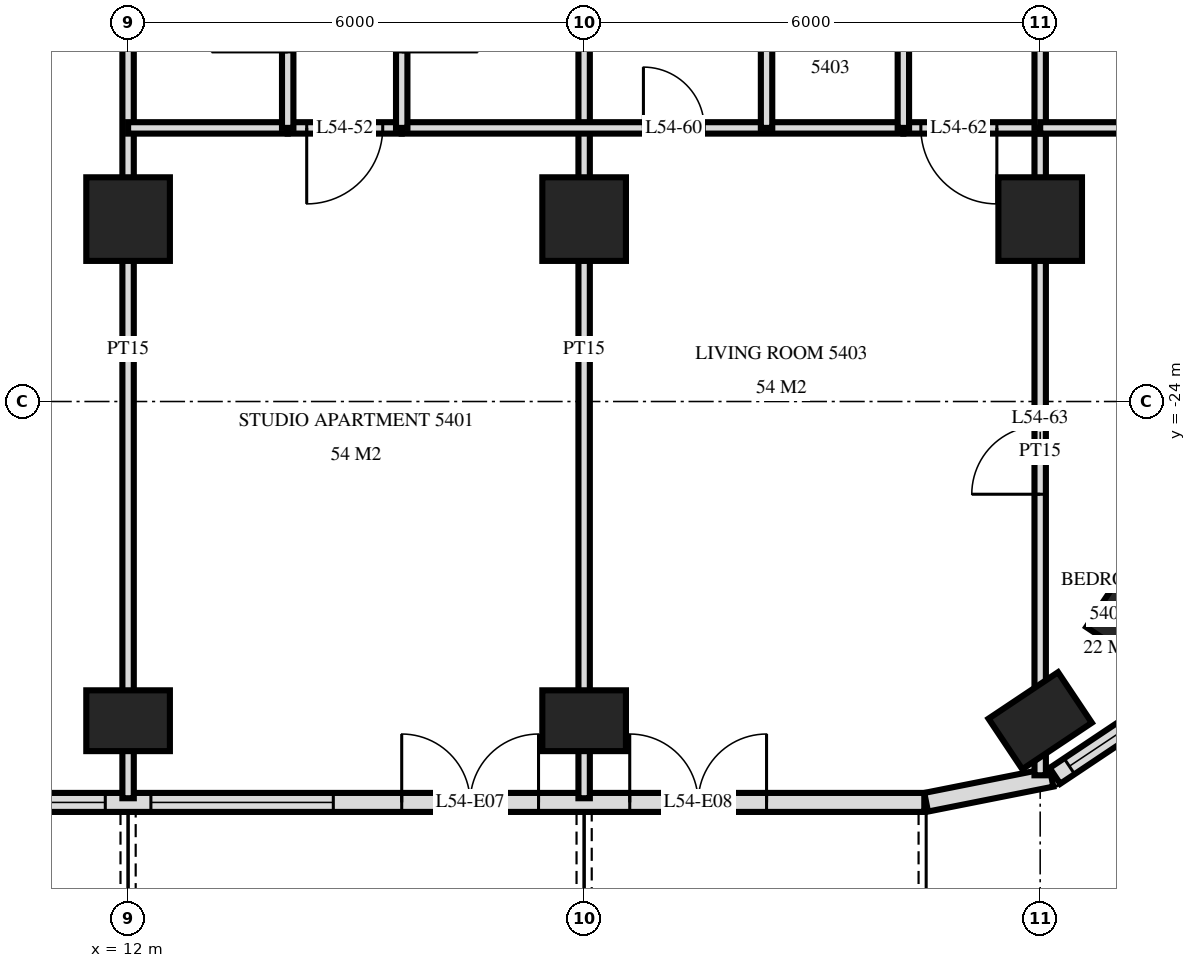
"""IFC4 building model, lengths in metres.
Left out: names, types, materials, properties, quantities, classifications, styles, units other than length and angle.
Written with IfcOpenShell. Run it as: python <this file> out.ifc"""

import sys

from ifc_helpers import new_model, si_unit, direction, frame, frame_2d, origin, origin_2d, place, context, subcontext, project, spatial, rectangle, extrude, element, fill, save


model = new_model("IFC4")
c1 = context("Model", 3, precision=1e-05, world=origin(), true_north=direction((0.0, 1.0)))
c2 = subcontext(c1, "Body", "Model", "MODEL_VIEW")
j1 = project(units=[si_unit("LENGTHUNIT", "METRE"), si_unit("PLANEANGLEUNIT", "RADIAN")], contexts=[c1])
p1 = place(None, origin())
s1 = spatial("IfcSite", under=j1, at=p1, CompositionType="ELEMENT")
p2 = place(p1, origin())
s2 = spatial("IfcBuilding", under=s1, at=p2, CompositionType="ELEMENT")
p3 = place(p2, frame((0.0, 0.0, 208.1)))
s3 = spatial("IfcBuildingStorey", under=s2, at=p3, CompositionType="ELEMENT", Elevation=208.1)
p4 = place(p3, frame((12.0, -28.2, 0.0), z_axis=(0.0, 0.0, 1.0), x_axis=(1.0, 0.0, 0.0)))
e1 = element("IfcColumn", 1, at=p4, inside=s3, PredefinedType="COLUMN", context=c2, shape_type="SweptSolid", body=[
    extrude(rectangle(XDim=1.1, YDim=0.8, at=origin_2d()), origin(), (0.0, 0.0, 1.0), 3.5),
])
p5 = place(p3, frame((12.0, -21.6, 0.0), z_axis=(0.0, 0.0, 1.0), x_axis=(1.0, 0.0, 0.0)))
e2 = element("IfcColumn", 2, at=p5, inside=s3, PredefinedType="COLUMN", context=c2, shape_type="SweptSolid", body=[
    extrude(rectangle(XDim=1.1, YDim=1.1, at=origin_2d()), origin(), (0.0, 0.0, 1.0), 3.5),
])
p6 = place(p3, frame((18.0, -28.2, 0.0), z_axis=(0.0, 0.0, 1.0), x_axis=(1.0, 0.0, 0.0)))
e3 = element("IfcColumn", 3, at=p6, inside=s3, PredefinedType="COLUMN", context=c2, shape_type="SweptSolid", body=[
    extrude(rectangle(XDim=1.1, YDim=0.8, at=origin_2d()), origin(), (0.0, 0.0, 1.0), 3.5),
])
p7 = place(p3, frame((18.0, -21.6, 0.0), z_axis=(0.0, 0.0, 1.0), x_axis=(1.0, 0.0, 0.0)))
e4 = element("IfcColumn", 4, at=p7, inside=s3, PredefinedType="COLUMN", context=c2, shape_type="SweptSolid", body=[
    extrude(rectangle(XDim=1.1, YDim=1.1, at=origin_2d()), origin(), (0.0, 0.0, 1.0), 3.5),
])
p8 = place(p3, frame((24.0, -28.2, 0.0), z_axis=(0.0, 0.0, 1.0), x_axis=(0.831459915646, 0.555584744817, 0.0)))
e5 = element("IfcColumn", 5, at=p8, inside=s3, PredefinedType="COLUMN", context=c2, shape_type="SweptSolid", body=[
    extrude(rectangle(XDim=1.1, YDim=0.8, at=origin_2d()), origin(), (0.0, 0.0, 1.0), 3.5),
])
p9 = place(p3, frame((24.0, -21.6, 0.0), z_axis=(0.0, 0.0, 1.0), x_axis=(1.0, 0.0, 0.0)))
e6 = element("IfcColumn", 6, at=p9, inside=s3, PredefinedType="COLUMN", context=c2, shape_type="SweptSolid", body=[
    extrude(rectangle(XDim=1.1, YDim=1.1, at=origin_2d()), origin(), (0.0, 0.0, 1.0), 3.5),
])
p10 = place(p3, frame((25.244, -26.733, 0.0), z_axis=(0.0, 0.0, 1.0), x_axis=(0.555584744817, 0.831459915646, 0.0)))
e7 = element("IfcColumn", 7, at=p10, inside=s3, PredefinedType="COLUMN", context=c2, shape_type="SweptSolid", body=[
    extrude(rectangle(XDim=1.1, YDim=0.8, at=origin_2d()), origin(), (0.0, 0.0, 1.0), 3.5),
])
p11 = place(p3, frame((-22.475, -29.275, 0.0), z_axis=(0.0, 0.0, 1.0), x_axis=(1.0, 0.0, 0.0)))
e8 = element("IfcWall", 8, at=p11, inside=s3, PredefinedType="SOLIDWALL", context=c2, shape_type="SweptSolid", body=[
    extrude(rectangle(XDim=44.951, YDim=0.25, at=frame_2d((22.475, 0.0))), origin(), (0.0, 0.0, 1.0), 3.22),
])
p12 = place(p11, frame((0.575, 0.0, 0.0)))
e9 = element("IfcOpeningElement", 9, at=p12, cuts=e8, PredefinedType="OPENING", context=c2, shape_type="SweptSolid", body=[
    extrude(rectangle(XDim=1.8, YDim=2.4, at=frame_2d((0.9, 1.2))), frame((0.0, 0.135, 0.0), z_axis=(0.0, -1.0, 0.0), x_axis=(1.0, 0.0, 0.0)), (0.0, 0.0, 1.0), 0.27),
])
p13 = place(p11, frame((6.2, 0.0, 0.0)))
e10 = element("IfcOpeningElement", 10, at=p13, cuts=e8, PredefinedType="OPENING", context=c2, shape_type="SweptSolid", body=[
    extrude(rectangle(XDim=1.8, YDim=2.4, at=frame_2d((0.9, 1.2))), frame((0.0, 0.135, 0.0), z_axis=(0.0, -1.0, 0.0), x_axis=(1.0, 0.0, 0.0)), (0.0, 0.0, 1.0), 0.27),
])
p14 = place(p11, frame((8.45, 0.0, 0.9)))
e11 = element("IfcOpeningElement", 11, at=p14, cuts=e8, PredefinedType="OPENING", context=c2, shape_type="SweptSolid", body=[
    extrude(rectangle(XDim=1.8, YDim=1.5, at=frame_2d((0.9, 0.75))), frame((0.0, 0.135, 0.0), z_axis=(0.0, -1.0, 0.0), x_axis=(1.0, 0.0, 0.0)), (0.0, 0.0, 1.0), 0.27),
])
p15 = place(p11, frame((11.075, 0.0, 0.0)))
e12 = element("IfcOpeningElement", 12, at=p15, cuts=e8, PredefinedType="OPENING", context=c2, shape_type="SweptSolid", body=[
    extrude(rectangle(XDim=1.8, YDim=2.4, at=frame_2d((0.9, 1.2))), frame((0.0, 0.135, 0.0), z_axis=(0.0, -1.0, 0.0), x_axis=(1.0, 0.0, 0.0)), (0.0, 0.0, 1.0), 0.27),
])
p16 = place(p11, frame((13.775, 0.0, 0.9)))
e13 = element("IfcOpeningElement", 13, at=p16, cuts=e8, PredefinedType="OPENING", context=c2, shape_type="SweptSolid", body=[
    extrude(rectangle(XDim=2.4, YDim=1.5, at=frame_2d((1.2, 0.75))), frame((0.0, 0.135, 0.0), z_axis=(0.0, -1.0, 0.0), x_axis=(1.0, 0.0, 0.0)), (0.0, 0.0, 1.0), 0.27),
])
p17 = place(p11, frame((16.775, 0.0, 0.9)))
e14 = element("IfcOpeningElement", 14, at=p17, cuts=e8, PredefinedType="OPENING", context=c2, shape_type="SweptSolid", body=[
    extrude(rectangle(XDim=2.4, YDim=1.5, at=frame_2d((1.2, 0.75))), frame((0.0, 0.135, 0.0), z_axis=(0.0, -1.0, 0.0), x_axis=(1.0, 0.0, 0.0)), (0.0, 0.0, 1.0), 0.27),
])
p18 = place(p11, frame((20.075, 0.0, 0.0)))
e15 = element("IfcOpeningElement", 15, at=p18, cuts=e8, PredefinedType="OPENING", context=c2, shape_type="SweptSolid", body=[
    extrude(rectangle(XDim=1.8, YDim=2.4, at=frame_2d((0.9, 1.2))), frame((0.0, 0.135, 0.0), z_axis=(0.0, -1.0, 0.0), x_axis=(1.0, 0.0, 0.0)), (0.0, 0.0, 1.0), 0.27),
])
p19 = place(p11, frame((23.075, 0.0, 0.0)))
e16 = element("IfcOpeningElement", 16, at=p19, cuts=e8, PredefinedType="OPENING", context=c2, shape_type="SweptSolid", body=[
    extrude(rectangle(XDim=1.8, YDim=2.4, at=frame_2d((0.9, 1.2))), frame((0.0, 0.135, 0.0), z_axis=(0.0, -1.0, 0.0), x_axis=(1.0, 0.0, 0.0)), (0.0, 0.0, 1.0), 0.27),
])
p20 = place(p11, frame((25.775, 0.0, 0.9)))
e17 = element("IfcOpeningElement", 17, at=p20, cuts=e8, PredefinedType="OPENING", context=c2, shape_type="SweptSolid", body=[
    extrude(rectangle(XDim=2.4, YDim=1.5, at=frame_2d((1.2, 0.75))), frame((0.0, 0.135, 0.0), z_axis=(0.0, -1.0, 0.0), x_axis=(1.0, 0.0, 0.0)), (0.0, 0.0, 1.0), 0.27),
])
p21 = place(p11, frame((29.075, 0.0, 0.0)))
e18 = element("IfcOpeningElement", 18, at=p21, cuts=e8, PredefinedType="OPENING", context=c2, shape_type="SweptSolid", body=[
    extrude(rectangle(XDim=1.8, YDim=2.4, at=frame_2d((0.9, 1.2))), frame((0.0, 0.135, 0.0), z_axis=(0.0, -1.0, 0.0), x_axis=(1.0, 0.0, 0.0)), (0.0, 0.0, 1.0), 0.27),
])
p22 = place(p11, frame((31.775, 0.0, 0.9)))
e19 = element("IfcOpeningElement", 19, at=p22, cuts=e8, PredefinedType="OPENING", context=c2, shape_type="SweptSolid", body=[
    extrude(rectangle(XDim=2.4, YDim=1.5, at=frame_2d((1.2, 0.75))), frame((0.0, 0.135, 0.0), z_axis=(0.0, -1.0, 0.0), x_axis=(1.0, 0.0, 0.0)), (0.0, 0.0, 1.0), 0.27),
])
p23 = place(p11, frame((34.775, 0.0, 0.9)))
e20 = element("IfcOpeningElement", 20, at=p23, cuts=e8, PredefinedType="OPENING", context=c2, shape_type="SweptSolid", body=[
    extrude(rectangle(XDim=2.4, YDim=1.5, at=frame_2d((1.2, 0.75))), frame((0.0, 0.135, 0.0), z_axis=(0.0, -1.0, 0.0), x_axis=(1.0, 0.0, 0.0)), (0.0, 0.0, 1.0), 0.27),
])
p24 = place(p11, frame((38.075, 0.0, 0.0)))
e21 = element("IfcOpeningElement", 21, at=p24, cuts=e8, PredefinedType="OPENING", context=c2, shape_type="SweptSolid", body=[
    extrude(rectangle(XDim=1.8, YDim=2.4, at=frame_2d((0.9, 1.2))), frame((0.0, 0.135, 0.0), z_axis=(0.0, -1.0, 0.0), x_axis=(1.0, 0.0, 0.0)), (0.0, 0.0, 1.0), 0.27),
])
p25 = place(p11, frame((41.075, 0.0, 0.0)))
e22 = element("IfcOpeningElement", 22, at=p25, cuts=e8, PredefinedType="OPENING", context=c2, shape_type="SweptSolid", body=[
    extrude(rectangle(XDim=1.8, YDim=2.4, at=frame_2d((0.9, 1.2))), frame((0.0, 0.135, 0.0), z_axis=(0.0, -1.0, 0.0), x_axis=(1.0, 0.0, 0.0)), (0.0, 0.0, 1.0), 0.27),
])
p26 = place(p3, frame((22.5, -29.273, 0.0), z_axis=(0.0, 0.0, 1.0), x_axis=(0.980775640221, 0.19513878023, 0.0)))
e23 = element("IfcWall", 23, at=p26, inside=s3, PredefinedType="SOLIDWALL", context=c2, shape_type="SweptSolid", body=[
    extrude(rectangle(XDim=1.681, YDim=0.25, at=frame_2d((0.841, 0.0))), origin(), (0.0, 0.0, 1.0), 3.22),
])
p27 = place(p3, frame((24.194, -28.926, 0.0), z_axis=(0.0, 0.0, 1.0), x_axis=(0.831482937015, 0.55555029066, 0.0)))
e24 = element("IfcWall", 24, at=p27, inside=s3, PredefinedType="SOLIDWALL", context=c2, shape_type="SweptSolid", body=[
    extrude(rectangle(XDim=1.656, YDim=0.25, at=frame_2d((0.828, 0.0))), origin(), (0.0, 0.0, 1.0), 3.22),
])
p28 = place(p27, frame((0.228, 0.0, 0.9)))
e25 = element("IfcOpeningElement", 25, at=p28, cuts=e24, PredefinedType="OPENING", context=c2, shape_type="SweptSolid", body=[
    extrude(rectangle(XDim=1.2, YDim=1.5, at=frame_2d((0.6, 0.75))), frame((0.0, 0.135, 0.0), z_axis=(0.0, -1.0, 0.0), x_axis=(1.0, 0.0, 0.0)), (0.0, 0.0, 1.0), 0.27),
])
p29 = place(p3, frame((24.0, -20.4, 0.0), z_axis=(0.0, 0.0, 1.0), x_axis=(0.0, 1.0, 0.0)))
e26 = element("IfcWall", 26, at=p29, inside=s3, PredefinedType="PARTITIONING", context=c2, shape_type="SweptSolid", body=[
    extrude(rectangle(XDim=3.0, YDim=0.15, at=frame_2d((1.5, 0.0))), origin(), (0.0, 0.0, 1.0), 3.22),
])
p30 = place(p29, frame((1.02, 0.0, 0.0)))
e27 = element("IfcOpeningElement", 27, at=p30, cuts=e26, PredefinedType="OPENING", context=c2, shape_type="SweptSolid", body=[
    extrude(rectangle(XDim=1.0, YDim=2.1, at=frame_2d((0.5, 1.05))), frame((0.0, 0.085, 0.0), z_axis=(0.0, -1.0, 0.0), x_axis=(1.0, 0.0, 0.0)), (0.0, 0.0, 1.0), 0.17),
])
p31 = place(p3, frame((24.0, -28.918, 0.0), z_axis=(0.0, 0.0, 1.0), x_axis=(0.0, 1.0, 0.0)))
e28 = element("IfcWall", 28, at=p31, inside=s3, PredefinedType="PARTITIONING", context=c2, shape_type="SweptSolid", body=[
    extrude(rectangle(XDim=8.518, YDim=0.15, at=frame_2d((4.259, 0.0))), origin(), (0.0, 0.0, 1.0), 3.22),
])
p32 = place(p31, frame((3.698, 0.0, 0.0)))
e29 = element("IfcOpeningElement", 29, at=p32, cuts=e28, PredefinedType="OPENING", context=c2, shape_type="SweptSolid", body=[
    extrude(rectangle(XDim=0.9, YDim=2.1, at=frame_2d((0.45, 1.05))), frame((0.0, 0.085, 0.0), z_axis=(0.0, -1.0, 0.0), x_axis=(1.0, 0.0, 0.0)), (0.0, 0.0, 1.0), 0.17),
])
for number, where, z_axis, x_axis in (
    (30, (22.2, -20.4, 0.0), (0.0, 0.0, 1.0), (0.0, 1.0, 0.0)),
    (31, (20.4, -20.4, 0.0), (0.0, 0.0, 1.0), (0.0, 1.0, 0.0)),
):
    element("IfcWall", number, at=place(p3, frame(where, z_axis=z_axis, x_axis=x_axis)), inside=s3, PredefinedType="PARTITIONING", context=c2, shape_type="SweptSolid", body=[
        extrude(rectangle(XDim=3.0, YDim=0.15, at=frame_2d((1.5, 0.0))), origin(), (0.0, 0.0, 1.0), 3.22),
    ])
p33 = place(p3, frame((18.0, -29.22, 0.0), z_axis=(0.0, 0.0, 1.0), x_axis=(0.0, 1.0, 0.0)))
e32 = element("IfcWall", 32, at=p33, inside=s3, PredefinedType="PARTITIONING", context=c2, shape_type="SweptSolid", body=[
    extrude(rectangle(XDim=11.82, YDim=0.15, at=frame_2d((5.91, 0.0))), origin(), (0.0, 0.0, 1.0), 3.22),
])
p34 = place(p3, frame((15.6, -20.4, 0.0), z_axis=(0.0, 0.0, 1.0), x_axis=(0.0, 1.0, 0.0)))
e33 = element("IfcWall", 33, at=p34, inside=s3, PredefinedType="PARTITIONING", context=c2, shape_type="SweptSolid", body=[
    extrude(rectangle(XDim=3.0, YDim=0.15, at=frame_2d((1.5, 0.0))), origin(), (0.0, 0.0, 1.0), 3.22),
])
p35 = place(p34, frame((1.0, 0.0, 0.0)))
e34 = element("IfcOpeningElement", 34, at=p35, cuts=e33, PredefinedType="OPENING", context=c2, shape_type="SweptSolid", body=[
    extrude(rectangle(XDim=1.0, YDim=2.1, at=frame_2d((0.5, 1.05))), frame((0.0, 0.085, 0.0), z_axis=(0.0, -1.0, 0.0), x_axis=(1.0, 0.0, 0.0)), (0.0, 0.0, 1.0), 0.17),
])
p36 = place(p3, frame((14.1, -20.4, 0.0), z_axis=(0.0, 0.0, 1.0), x_axis=(0.0, 1.0, 0.0)))
e35 = element("IfcWall", 35, at=p36, inside=s3, PredefinedType="PARTITIONING", context=c2, shape_type="SweptSolid", body=[
    extrude(rectangle(XDim=3.0, YDim=0.15, at=frame_2d((1.5, 0.0))), origin(), (0.0, 0.0, 1.0), 3.22),
])
p37 = place(p36, frame((1.0, 0.0, 0.0)))
e36 = element("IfcOpeningElement", 36, at=p37, cuts=e35, PredefinedType="OPENING", context=c2, shape_type="SweptSolid", body=[
    extrude(rectangle(XDim=1.0, YDim=2.1, at=frame_2d((0.5, 1.05))), frame((0.0, 0.085, 0.0), z_axis=(0.0, -1.0, 0.0), x_axis=(1.0, 0.0, 0.0)), (0.0, 0.0, 1.0), 0.17),
])
p38 = place(p3, frame((12.0, -29.22, 0.0), z_axis=(0.0, 0.0, 1.0), x_axis=(0.0, 1.0, 0.0)))
e37 = element("IfcWall", 37, at=p38, inside=s3, PredefinedType="PARTITIONING", context=c2, shape_type="SweptSolid", body=[
    extrude(rectangle(XDim=11.82, YDim=0.15, at=frame_2d((5.91, 0.0))), origin(), (0.0, 0.0, 1.0), 3.22),
])
p39 = place(p3, frame((14.1, -20.4, 0.0), z_axis=(0.0, 0.0, 1.0), x_axis=(1.0, 0.0, 0.0)))
e38 = element("IfcWall", 38, at=p39, inside=s3, PredefinedType="PARTITIONING", context=c2, shape_type="SweptSolid", body=[
    extrude(rectangle(XDim=1.5, YDim=0.15, at=frame_2d((0.75, 0.0))), origin(), (0.0, 0.0, 1.0), 3.22),
])
p40 = place(p39, frame((0.25, 0.0, 0.0)))
e39 = element("IfcOpeningElement", 39, at=p40, cuts=e38, PredefinedType="OPENING", context=c2, shape_type="SweptSolid", body=[
    extrude(rectangle(XDim=1.0, YDim=2.1, at=frame_2d((0.5, 1.05))), frame((0.0, 0.085, 0.0), z_axis=(0.0, -1.0, 0.0), x_axis=(1.0, 0.0, 0.0)), (0.0, 0.0, 1.0), 0.17),
])
p41 = place(p3, frame((22.2, -20.4, 0.0), z_axis=(0.0, 0.0, 1.0), x_axis=(1.0, 0.0, 0.0)))
e40 = element("IfcWall", 40, at=p41, inside=s3, PredefinedType="PARTITIONING", context=c2, shape_type="SweptSolid", body=[
    extrude(rectangle(XDim=1.8, YDim=0.15, at=frame_2d((0.9, 0.0))), origin(), (0.0, 0.0, 1.0), 3.22),
])
p42 = place(p41, frame((0.23, 0.0, 0.0)))
e41 = element("IfcOpeningElement", 41, at=p42, cuts=e40, PredefinedType="OPENING", context=c2, shape_type="SweptSolid", body=[
    extrude(rectangle(XDim=1.0, YDim=2.1, at=frame_2d((0.5, 1.05))), frame((0.0, 0.085, 0.0), z_axis=(0.0, -1.0, 0.0), x_axis=(1.0, 0.0, 0.0)), (0.0, 0.0, 1.0), 0.17),
])
p43 = place(p3, frame((12.0, -20.4, 0.0), z_axis=(0.0, 0.0, 1.0), x_axis=(1.0, 0.0, 0.0)))
e42 = element("IfcWall", 42, at=p43, inside=s3, PredefinedType="PARTITIONING", context=c2, shape_type="SweptSolid", body=[
    extrude(rectangle(XDim=2.1, YDim=0.15, at=frame_2d((1.05, 0.0))), origin(), (0.0, 0.0, 1.0), 3.22),
])
p44 = place(p3, frame((15.6, -20.4, 0.0), z_axis=(0.0, 0.0, 1.0), x_axis=(1.0, 0.0, 0.0)))
e43 = element("IfcWall", 43, at=p44, inside=s3, PredefinedType="PARTITIONING", context=c2, shape_type="SweptSolid", body=[
    extrude(rectangle(XDim=6.6, YDim=0.15, at=frame_2d((3.3, 0.0))), origin(), (0.0, 0.0, 1.0), 3.22),
])
p45 = place(p44, frame((3.18, 0.0, 0.0)))
e44 = element("IfcOpeningElement", 44, at=p45, cuts=e43, PredefinedType="OPENING", context=c2, shape_type="SweptSolid", body=[
    extrude(rectangle(XDim=0.8, YDim=2.1, at=frame_2d((0.4, 1.05))), frame((0.0, 0.085, 0.0), z_axis=(0.0, -1.0, 0.0), x_axis=(1.0, 0.0, 0.0)), (0.0, 0.0, 1.0), 0.17),
])
p46 = place(p3, frame((24.0, -20.4, 0.0), z_axis=(0.0, 0.0, 1.0), x_axis=(1.0, 0.0, 0.0)))
e45 = element("IfcWall", 45, at=p46, inside=s3, PredefinedType="PARTITIONING", context=c2, shape_type="SweptSolid", body=[
    extrude(rectangle(XDim=2.82, YDim=0.15, at=frame_2d((1.41, 0.0))), origin(), (0.0, 0.0, 1.0), 3.22),
])
p47 = place(p28, origin())
e46 = element("IfcWindow", 46, at=p47, inside=s3, PartitioningType="SINGLE_PANEL", PredefinedType="WINDOW", context=c2, shape_type="SweptSolid", body=[
    extrude(rectangle(XDim=1.2, YDim=1.5, at=frame_2d((0.6, 0.75))), frame((0.0, 0.03, 0.0), z_axis=(0.0, -1.0, 0.0), x_axis=(1.0, 0.0, 0.0)), (0.0, 0.0, 1.0), 0.06),
])
fill(e25, e46)
p48 = place(p22, origin())
e47 = element("IfcWindow", 47, at=p48, inside=s3, PartitioningType="SINGLE_PANEL", PredefinedType="WINDOW", context=c2, shape_type="SweptSolid", body=[
    extrude(rectangle(XDim=2.4, YDim=1.5, at=frame_2d((1.2, 0.75))), frame((0.0, 0.03, 0.0), z_axis=(0.0, -1.0, 0.0), x_axis=(1.0, 0.0, 0.0)), (0.0, 0.0, 1.0), 0.06),
])
fill(e19, e47)
p49 = place(p23, origin())
e48 = element("IfcWindow", 48, at=p49, inside=s3, PartitioningType="SINGLE_PANEL", PredefinedType="WINDOW", context=c2, shape_type="SweptSolid", body=[
    extrude(rectangle(XDim=2.4, YDim=1.5, at=frame_2d((1.2, 0.75))), frame((0.0, 0.03, 0.0), z_axis=(0.0, -1.0, 0.0), x_axis=(1.0, 0.0, 0.0)), (0.0, 0.0, 1.0), 0.06),
])
fill(e20, e48)
p50 = place(p24, origin())
e49 = element("IfcDoor", 49, at=p50, inside=s3, OperationType="DOUBLE_DOOR_SINGLE_SWING", PredefinedType="DOOR", context=c2, shape_type="SweptSolid", body=[
    extrude(rectangle(XDim=1.8, YDim=2.4, at=frame_2d((0.9, 1.2))), frame((0.0, 0.025, 0.0), z_axis=(0.0, -1.0, 0.0), x_axis=(1.0, 0.0, 0.0)), (0.0, 0.0, 1.0), 0.05),
])
fill(e21, e49)
p51 = place(p25, origin())
e50 = element("IfcDoor", 50, at=p51, inside=s3, OperationType="DOUBLE_DOOR_SINGLE_SWING", PredefinedType="DOOR", context=c2, shape_type="SweptSolid", body=[
    extrude(rectangle(XDim=1.8, YDim=2.4, at=frame_2d((0.9, 1.2))), frame((0.0, 0.025, 0.0), z_axis=(0.0, -1.0, 0.0), x_axis=(1.0, 0.0, 0.0)), (0.0, 0.0, 1.0), 0.05),
])
fill(e22, e50)
p52 = place(p40, frame((0.5, 0.0, 0.0), z_axis=(0.0, 0.0, 1.0), x_axis=(-1.0, 0.0, 0.0)))
e51 = element("IfcDoor", 51, at=p52, inside=s3, OperationType="SINGLE_SWING_LEFT", PredefinedType="DOOR", context=c2, shape_type="SweptSolid", body=[
    extrude(rectangle(XDim=1.0, YDim=2.1, at=frame_2d((0.0, 1.05))), frame((0.0, -0.025, 0.0), z_axis=(0.0, 1.0, 0.0), x_axis=(-1.0, 0.0, 0.0)), (0.0, 0.0, 1.0), 0.05),
])
fill(e39, e51)
p53 = place(p45, origin())
e52 = element("IfcDoor", 52, at=p53, inside=s3, OperationType="SINGLE_SWING_RIGHT", PredefinedType="DOOR", context=c2, shape_type="SweptSolid", body=[
    extrude(rectangle(XDim=0.8, YDim=2.1, at=frame_2d((0.4, 1.05))), frame((0.0, 0.025, 0.0), z_axis=(0.0, -1.0, 0.0), x_axis=(1.0, 0.0, 0.0)), (0.0, 0.0, 1.0), 0.05),
])
fill(e44, e52)
p54 = place(p42, frame((0.5, 0.0, 0.0), z_axis=(0.0, 0.0, 1.0), x_axis=(-1.0, 0.0, 0.0)))
e53 = element("IfcDoor", 53, at=p54, inside=s3, OperationType="SINGLE_SWING_RIGHT", PredefinedType="DOOR", context=c2, shape_type="SweptSolid", body=[
    extrude(rectangle(XDim=1.0, YDim=2.1, at=frame_2d((0.0, 1.05))), frame((0.0, -0.025, 0.0), z_axis=(0.0, 1.0, 0.0), x_axis=(-1.0, 0.0, 0.0)), (0.0, 0.0, 1.0), 0.05),
])
fill(e41, e53)
p55 = place(p32, origin())
e54 = element("IfcDoor", 54, at=p55, inside=s3, OperationType="SINGLE_SWING_RIGHT", PredefinedType="DOOR", context=c2, shape_type="SweptSolid", body=[
    extrude(rectangle(XDim=0.9, YDim=2.1, at=frame_2d((0.45, 1.05))), frame((0.0, 0.025, 0.0), z_axis=(0.0, -1.0, 0.0), x_axis=(1.0, 0.0, 0.0)), (0.0, 0.0, 1.0), 0.05),
])
fill(e29, e54)
save(model, sys.argv[1])
